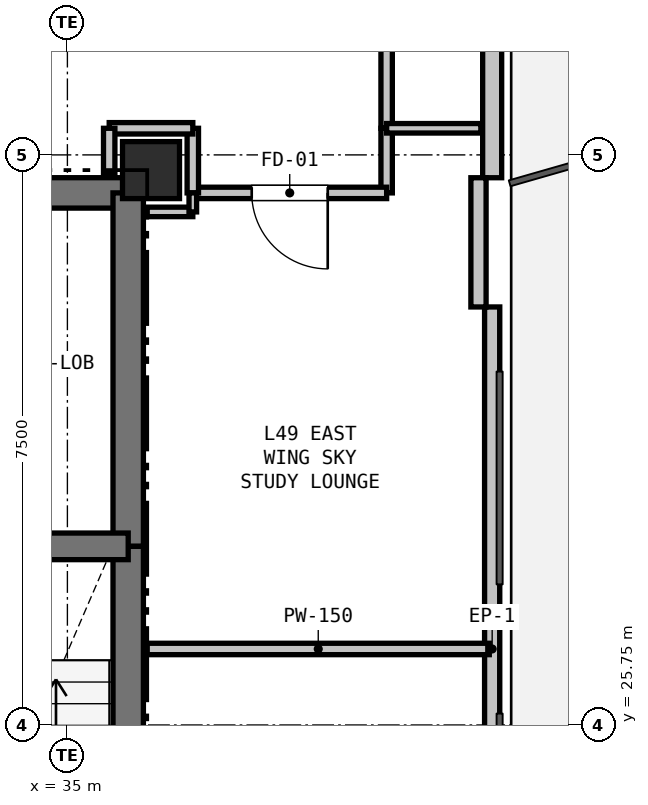
"""IFC4 building model, lengths in metres.
Left out: names, types, materials, properties, quantities, classifications, styles, units other than length and angle.
Written with IfcOpenShell. Run it as: python <this file> out.ifc"""

import sys

from ifc_helpers import new_model, si_unit, direction, frame, frame_2d, origin, origin_2d, place, context, subcontext, project, spatial, rectangle, extrude, element, fill, save


model = new_model("IFC4")
c1 = context("Model", 3, precision=1e-05, world=origin(), true_north=direction((0.0, 1.0)))
c2 = subcontext(c1, "Body", "Model", "MODEL_VIEW")
j1 = project(units=[si_unit("LENGTHUNIT", "METRE"), si_unit("PLANEANGLEUNIT", "RADIAN")], contexts=[c1])
p1 = place(None, origin())
s1 = spatial("IfcSite", under=j1, at=p1, CompositionType="ELEMENT")
p2 = place(p1, origin())
s2 = spatial("IfcBuilding", under=s1, at=p2, CompositionType="ELEMENT")
p3 = place(p2, frame((0.0, 0.0, 178.8)))
s3 = spatial("IfcBuildingStorey", under=s2, at=p3, CompositionType="ELEMENT", Elevation=178.8)
p4 = place(p3, frame((36.1, 33.05, 0.0), z_axis=(0.0, 0.0, 1.0), x_axis=(1.0, 0.0, 0.0)))
e1 = element("IfcColumn", 1, at=p4, inside=s3, PredefinedType="COLUMN", context=c2, shape_type="SweptSolid", body=[
    extrude(rectangle(XDim=0.75, YDim=0.75, at=origin_2d()), origin(), (0.0, 0.0, 1.0), 3.3),
])
p5 = place(p3, frame((40.588, 42.648, 0.0), z_axis=(0.0, 0.0, 1.0), x_axis=(0.0, -1.0, 0.0)))
e2 = element("IfcWall", 2, at=p5, inside=s3, PredefinedType="SOLIDWALL", context=c2, shape_type="SweptSolid", body=[
    extrude(rectangle(XDim=9.699, YDim=0.25, at=frame_2d((4.85, 0.0))), origin(), (0.0, 0.0, 1.0), 2.69),
])
p6 = place(p5, frame((1.73, 0.0, 0.0)))
e3 = element("IfcOpeningElement", 3, at=p6, cuts=e2, PredefinedType="OPENING", context=c2, shape_type="SweptSolid", body=[
    extrude(rectangle(XDim=1.1, YDim=2.1, at=frame_2d((0.55, 1.05))), frame((0.0, 0.135, 0.0), z_axis=(0.0, -1.0, 0.0), x_axis=(1.0, 0.0, 0.0)), (0.0, 0.0, 1.0), 0.27),
])
p7 = place(p3, frame((40.588, 31.25, 0.0), z_axis=(0.0, 0.0, 1.0), x_axis=(0.0, -1.0, 0.0)))
e4 = element("IfcWall", 4, at=p7, inside=s3, PredefinedType="PARAPET", context=c2, shape_type="SweptSolid", body=[
    extrude(rectangle(XDim=8.999, YDim=0.2, at=frame_2d((4.5, 0.0))), origin(), (0.0, 0.0, 1.0), 0.2),
])
p8 = place(p3, frame((40.408, 32.949, 0.0), z_axis=(0.0, 0.0, 1.0), x_axis=(0.0, -1.0, 0.0)))
e5 = element("IfcWall", 5, at=p8, inside=s3, PredefinedType="PARAPET", context=c2, shape_type="SweptSolid", body=[
    extrude(rectangle(XDim=1.7, YDim=0.2, at=frame_2d((0.85, 0.0))), origin(), (0.0, 0.0, 1.0), 2.69),
])
p9 = place(p3, frame((32.35, 32.75, 0.0), z_axis=(0.0, 0.0, 1.0), x_axis=(1.0, 0.0, 0.0)))
e6 = element("IfcWall", 6, at=p9, inside=s3, PredefinedType="SHEAR", context=c2, shape_type="SweptSolid", body=[
    extrude(rectangle(XDim=3.45, YDim=0.4, at=frame_2d((1.725, 0.0))), origin(), (0.0, 0.0, 1.0), 3.07),
])
p10 = place(p9, frame((0.65, 0.0, 0.0)))
e7 = element("IfcOpeningElement", 7, at=p10, cuts=e6, PredefinedType="OPENING", context=c2, shape_type="SweptSolid", body=[
    extrude(rectangle(XDim=1.15, YDim=2.15, at=frame_2d((0.575, 1.075))), frame((0.0, 0.21, 0.0), z_axis=(0.0, -1.0, 0.0), x_axis=(1.0, 0.0, 0.0)), (0.0, 0.0, 1.0), 0.42),
])
p11 = place(p3, frame((35.8, 32.75, 0.0), z_axis=(0.0, 0.0, 1.0), x_axis=(0.0, -1.0, 0.0)))
e8 = element("IfcWall", 8, at=p11, inside=s3, PredefinedType="SHEAR", context=c2, shape_type="SweptSolid", body=[
    extrude(rectangle(XDim=4.65, YDim=0.4, at=frame_2d((2.325, 0.0))), origin(), (0.0, 0.0, 1.0), 3.07),
])
p12 = place(p3, frame((35.8, 28.1, 0.0), z_axis=(0.0, 0.0, 1.0), x_axis=(0.0, -1.0, 0.0)))
e9 = element("IfcWall", 9, at=p12, inside=s3, PredefinedType="SHEAR", context=c2, shape_type="SweptSolid", body=[
    extrude(rectangle(XDim=7.35, YDim=0.4, at=frame_2d((3.675, 0.0))), origin(), (0.0, 0.0, 1.0), 3.07),
])
p13 = place(p3, frame((32.35, 28.1, 0.0), z_axis=(0.0, 0.0, 1.0), x_axis=(1.0, 0.0, 0.0)))
e10 = element("IfcWall", 10, at=p13, inside=s3, PredefinedType="SHEAR", context=c2, shape_type="SweptSolid", body=[
    extrude(rectangle(XDim=3.45, YDim=0.35, at=frame_2d((1.725, 0.0))), origin(), (0.0, 0.0, 1.0), 3.07),
])
p14 = place(p13, frame((1.15, 0.0, 0.0)))
e11 = element("IfcOpeningElement", 11, at=p14, cuts=e10, PredefinedType="OPENING", context=c2, shape_type="SweptSolid", body=[
    extrude(rectangle(XDim=1.15, YDim=2.15, at=frame_2d((0.575, 1.075))), frame((0.0, 0.185, 0.0), z_axis=(0.0, -1.0, 0.0), x_axis=(1.0, 0.0, 0.0)), (0.0, 0.0, 1.0), 0.37),
])
p15 = place(p3, frame((39.2, 35.35, 0.0), z_axis=(0.0, 0.0, 1.0), x_axis=(0.0, -1.0, 0.0)))
e12 = element("IfcWall", 12, at=p15, inside=s3, PredefinedType="PARTITIONING", context=c2, shape_type="SweptSolid", body=[
    extrude(rectangle(XDim=1.75, YDim=0.15, at=frame_2d((0.875, 0.0))), origin(), (0.0, 0.0, 1.0), 3.07),
])
p16 = place(p3, frame((39.2, 33.6, 0.0), z_axis=(0.0, 0.0, 1.0), x_axis=(0.0, -1.0, 0.0)))
e13 = element("IfcWall", 13, at=p16, inside=s3, PredefinedType="PARTITIONING", context=c2, shape_type="SweptSolid", body=[
    extrude(rectangle(XDim=0.85, YDim=0.15, at=frame_2d((0.425, 0.0))), origin(), (0.0, 0.0, 1.0), 3.07),
])
p17 = place(p3, frame((39.2, 32.75, 0.0), z_axis=(0.0, 0.0, 1.0), x_axis=(-1.0, 0.0, 0.0)))
e14 = element("IfcWall", 14, at=p17, inside=s3, PredefinedType="PARTITIONING", context=c2, shape_type="SweptSolid", body=[
    extrude(rectangle(XDim=2.55, YDim=0.15, at=frame_2d((1.275, 0.0))), origin(), (0.0, 0.0, 1.0), 3.07),
])
p18 = place(p17, frame((0.775, 0.0, 0.0)))
e15 = element("IfcOpeningElement", 15, at=p18, cuts=e14, PredefinedType="OPENING", context=c2, shape_type="SweptSolid", body=[
    extrude(rectangle(XDim=1.0, YDim=2.15, at=frame_2d((0.5, 1.075))), frame((0.0, 0.085, 0.0), z_axis=(0.0, -1.0, 0.0), x_axis=(1.0, 0.0, 0.0)), (0.0, 0.0, 1.0), 0.17),
])
p19 = place(p3, frame((36.65, 32.75, 0.0), z_axis=(0.0, 0.0, 1.0), x_axis=(0.0, 1.0, 0.0)))
e16 = element("IfcWall", 16, at=p19, inside=s3, PredefinedType="PARTITIONING", context=c2, shape_type="SweptSolid", body=[
    extrude(rectangle(XDim=0.85, YDim=0.15, at=frame_2d((0.425, 0.0))), origin(), (0.0, 0.0, 1.0), 2.518),
])
p20 = place(p3, frame((36.65, 33.6, 0.0), z_axis=(0.0, 0.0, 1.0), x_axis=(-1.0, 0.0, 0.0)))
e17 = element("IfcWall", 17, at=p20, inside=s3, PredefinedType="PARTITIONING", context=c2, shape_type="SweptSolid", body=[
    extrude(rectangle(XDim=1.1, YDim=0.15, at=frame_2d((0.55, 0.0))), origin(), (0.0, 0.0, 1.0), 2.518),
])
p21 = place(p3, frame((35.55, 33.6, 0.0), z_axis=(0.0, 0.0, 1.0), x_axis=(0.0, -1.0, 0.0)))
e18 = element("IfcWall", 18, at=p21, inside=s3, PredefinedType="PARTITIONING", context=c2, shape_type="SweptSolid", body=[
    extrude(rectangle(XDim=0.6, YDim=0.15, at=frame_2d((0.3, 0.0))), origin(), (0.0, 0.0, 1.0), 2.595),
])
p22 = place(p3, frame((36.05, 32.5, 0.0), z_axis=(0.0, 0.0, 1.0), x_axis=(1.0, 0.0, 0.0)))
e19 = element("IfcWall", 19, at=p22, inside=s3, PredefinedType="PARTITIONING", context=c2, shape_type="SweptSolid", body=[
    extrude(rectangle(XDim=0.6, YDim=0.125, at=frame_2d((0.3, 0.0))), origin(), (0.0, 0.0, 1.0), 2.595),
])
p23 = place(p3, frame((36.65, 32.5, 0.0), z_axis=(0.0, 0.0, 1.0), x_axis=(0.0, 1.0, 0.0)))
e20 = element("IfcWall", 20, at=p23, inside=s3, PredefinedType="PARTITIONING", context=c2, shape_type="SweptSolid", body=[
    extrude(rectangle(XDim=0.25, YDim=0.1, at=frame_2d((0.125, 0.0))), origin(), (0.0, 0.0, 1.0), 3.07),
])
p24 = place(p3, frame((39.2, 33.6, 0.0), z_axis=(0.0, 0.0, 1.0), x_axis=(1.0, 0.0, 0.0)))
e21 = element("IfcWall", 21, at=p24, inside=s3, PredefinedType="PARTITIONING", context=c2, shape_type="SweptSolid", body=[
    extrude(rectangle(XDim=1.24, YDim=0.125, at=frame_2d((0.62, 0.0))), origin(), (0.0, 0.0, 1.0), 2.365),
])
p25 = place(p3, frame((40.55, 26.75, 0.0), z_axis=(0.0, 0.0, 1.0), x_axis=(-1.0, 0.0, 0.0)))
e22 = element("IfcWall", 22, at=p25, inside=s3, PredefinedType="PARTITIONING", context=c2, shape_type="SweptSolid", body=[
    extrude(rectangle(XDim=4.5, YDim=0.15, at=frame_2d((2.25, 0.0))), origin(), (0.0, 0.0, 1.0), 2.365),
])
p26 = place(p18, origin())
e23 = element("IfcDoor", 23, at=p26, inside=s3, OperationType="SINGLE_SWING_LEFT", PredefinedType="DOOR", context=c2, shape_type="SweptSolid", body=[
    extrude(rectangle(XDim=1.0, YDim=2.15, at=frame_2d((0.5, 1.075))), frame((0.0, 0.025, 0.0), z_axis=(0.0, -1.0, 0.0), x_axis=(1.0, 0.0, 0.0)), (0.0, 0.0, 1.0), 0.05),
])
fill(e15, e23)
save(model, sys.argv[1])
